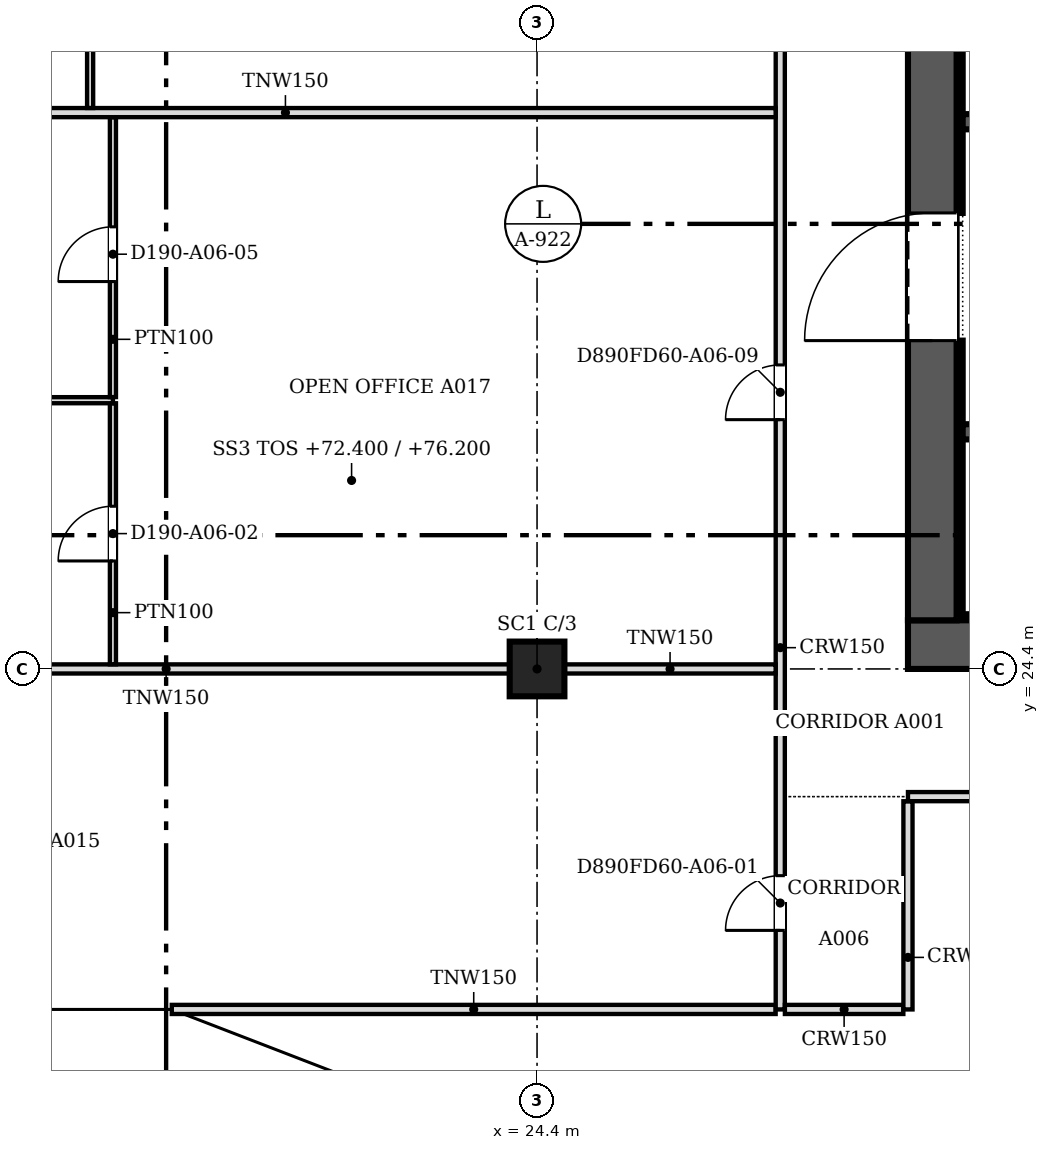
"""IFC4 building model, lengths in metres.
Left out: names, types, materials, properties, quantities, classifications, styles, units other than length and angle.
Written with IfcOpenShell. Run it as: python <this file> out.ifc"""

import sys

from ifc_helpers import new_model, si_unit, direction, frame, frame_2d, origin, origin_2d, place, context, subcontext, project, spatial, polyline, rectangle, outline, extrude, faceted_brep, source, transform, mapped, element, fill, save


model = new_model("IFC4")
c1 = context("Model", 3, precision=1e-05, world=origin(), true_north=direction((0.0, 1.0)))
c2 = subcontext(c1, "Body", "Model", "MODEL_VIEW")
j1 = project(units=[si_unit("LENGTHUNIT", "METRE"), si_unit("PLANEANGLEUNIT", "RADIAN")], contexts=[c1])
p1 = place(None, origin())
s1 = spatial("IfcSite", under=j1, at=p1, CompositionType="ELEMENT")
p2 = place(p1, origin())
s2 = spatial("IfcBuilding", under=s1, at=p2, CompositionType="ELEMENT")
p3 = place(p2, frame((0.0, 0.0, 72.4)))
s3 = spatial("IfcBuildingStorey", under=s2, at=p3, CompositionType="ELEMENT", Elevation=72.4)
p4 = place(p3, frame((24.4, 24.4, 0.0), z_axis=(0.0, 0.0, 1.0), x_axis=(1.0, 0.0, 0.0)))
e1 = element("IfcColumn", 1, at=p4, inside=s3, PredefinedType="COLUMN", context=c2, shape_type="SweptSolid", body=[
    extrude(rectangle(XDim=0.9, YDim=0.9, at=origin_2d()), origin(), (0.0, 0.0, 1.0), 3.6),
])
m1 = source(origin(), c2, "Body", "Brep", [
    faceted_brep([(3.05, -0.25, 0.0), (6.1, -0.25, 3.743), (6.1, -0.25, 3.857), (3.05, -0.25, 7.6), (0.0, -0.25, 3.8), (0.0, 0.25, 3.8), (3.05, 0.25, 7.6), (6.146, 0.25, 3.8), (3.05, 0.25, 0.0), (6.146, -0.0, 3.8)], [[[0, 1, 2, 3, 4]], [[5, 6, 7, 8]], [[8, 7, 9, 1, 0]], [[7, 6, 3, 2, 9]], [[6, 5, 4, 3]], [[5, 8, 0, 4]], [[1, 9, 2]]]),
])
p5 = place(p3, frame((12.2, 18.55, -3.8), z_axis=(0.0, 0.0, 1.0), x_axis=(1.0, 0.0, 0.0)))
e2 = element("IfcWall", 2, at=p5, inside=s3, PredefinedType="SOLIDWALL", context=c2, shape_type="MappedRepresentation", body=[
    mapped(m1, transform((0.0, 0.0, 0.0), scale=1.0)),
])
m2 = source(origin(), c2, "Body", "SweptSolid", [
    extrude(outline(polyline([(3.052, 0.397), (5.824, 3.8), (3.052, 7.202), (0.321, 3.8), (3.052, 0.397)])), frame((0.0, 0.26, 0.0), z_axis=(0.0, -1.0, 0.0), x_axis=(1.0, 0.0, 0.0)), (0.0, 0.0, 1.0), 0.52),
])
p6 = place(p5, origin())
e3 = element("IfcOpeningElement", 3, at=p6, cuts=e2, PredefinedType="OPENING", context=c2, shape_type="MappedRepresentation", body=[
    mapped(m2, transform((0.0, 0.0, 0.0), scale=1.0)),
])
m3 = source(origin(), c2, "Body", "Brep", [
    faceted_brep([(3.096, -0.25, 7.536), (0.047, -0.25, 3.856), (0.047, -0.25, 3.744), (3.096, -0.25, 0.064), (0.0, 0.25, 3.8), (3.149, 0.25, 7.6), (3.202, 0.25, 7.536), (3.202, 0.25, 0.064), (3.149, 0.25, 0.0), (3.149, -0.0, 0.0), (3.149, -0.0, 7.6), (0.0, 0.0, 3.8)], [[[0, 1, 2, 3]], [[4, 5, 6, 7, 8]], [[8, 7, 9]], [[6, 5, 10]], [[5, 4, 11, 1, 0, 10]], [[4, 8, 9, 3, 2, 11]], [[11, 2, 1]], [[3, 9, 7, 6, 10, 0]]]),
])
p7 = place(p3, frame((18.346, 18.55, -3.8), z_axis=(0.0, 0.0, 1.0), x_axis=(0.932985567668, -0.359913782069, 0.0)))
e4 = element("IfcWall", 4, at=p7, inside=s3, PredefinedType="SOLIDWALL", context=c2, shape_type="MappedRepresentation", body=[
    mapped(m3, transform((0.0, 0.0, 0.0), scale=1.0)),
])
m4 = source(origin(), c2, "Body", "SweptSolid", [
    extrude(outline(polyline([(2.949, 6.967), (0.325, 3.8), (2.949, 0.633), (2.949, 6.967)])), frame((0.0, 0.26, 0.0), z_axis=(0.0, -1.0, 0.0), x_axis=(1.0, 0.0, 0.0)), (0.0, 0.0, 1.0), 0.52),
])
p8 = place(p7, origin())
e5 = element("IfcOpeningElement", 5, at=p8, cuts=e4, PredefinedType="OPENING", context=c2, shape_type="MappedRepresentation", body=[
    mapped(m4, transform((0.0, 0.0, 0.0), scale=1.0)),
])
p9 = place(p2, frame((0.0, 0.0, 76.2)))
s4 = spatial("IfcBuildingStorey", under=s2, at=p9, CompositionType="ELEMENT", Elevation=76.2)
m5 = source(origin(), c2, "Body", "Brep", [
    faceted_brep([(3.05, -0.25, 7.543), (0.0, -0.25, 3.8), (3.05, -0.25, 0.057), (0.0, 0.25, 3.8), (3.096, 0.25, 7.6), (3.143, 0.25, 7.544), (3.143, 0.25, 0.056), (3.096, 0.25, 0.0), (3.096, -0.0, 0.0), (3.096, -0.0, 7.6)], [[[0, 1, 2]], [[3, 4, 5, 6, 7]], [[7, 6, 8]], [[5, 4, 9]], [[4, 3, 1, 0, 9]], [[3, 7, 8, 2, 1]], [[2, 8, 6, 5, 9, 0]]]),
])
p10 = place(p9, frame((15.25, 18.55, -3.8), z_axis=(0.0, 0.0, 1.0), x_axis=(1.0, 0.0, 0.0)))
e6 = element("IfcWall", 6, at=p10, inside=s4, PredefinedType="SOLIDWALL", context=c2, shape_type="MappedRepresentation", body=[
    mapped(m5, transform((0.0, 0.0, 0.0), scale=1.0)),
])
m6 = source(origin(), c2, "Body", "SweptSolid", [
    extrude(outline(polyline([(2.896, 6.959), (0.323, 3.8), (2.896, 0.641), (2.896, 6.959)])), frame((0.0, 0.26, 0.0), z_axis=(0.0, -1.0, 0.0), x_axis=(1.0, 0.0, 0.0)), (0.0, 0.0, 1.0), 0.52),
])
p11 = place(p10, origin())
e7 = element("IfcOpeningElement", 7, at=p11, cuts=e6, PredefinedType="OPENING", context=c2, shape_type="MappedRepresentation", body=[
    mapped(m6, transform((0.0, 0.0, 0.0), scale=1.0)),
])
m7 = source(origin(), c2, "Body", "Brep", [
    faceted_brep([(0.093, -0.25, 0.056), (3.143, -0.25, 3.736), (3.143, -0.25, 3.864), (0.093, -0.25, 7.544), (0.0, 0.25, 7.543), (0.047, 0.25, 7.6), (3.196, 0.25, 3.8), (0.047, 0.25, 0.0), (0.0, 0.25, 0.057), (3.196, -0.0, 3.8), (0.047, 0.0, 0.0), (0.047, 0.0, 7.6)], [[[0, 1, 2, 3]], [[4, 5, 6, 7, 8]], [[7, 6, 9, 1, 0, 10]], [[6, 5, 11, 3, 2, 9]], [[5, 4, 11]], [[8, 7, 10]], [[8, 10, 0, 3, 11, 4]], [[1, 9, 2]]]),
])
p12 = place(p9, frame((18.303, 18.567, -3.8), z_axis=(0.0, 0.0, 1.0), x_axis=(0.932978940178, -0.359930961693, 0.0)))
e8 = element("IfcWall", 8, at=p12, inside=s4, PredefinedType="SOLIDWALL", context=c2, shape_type="MappedRepresentation", body=[
    mapped(m7, transform((0.0, 0.0, 0.0), scale=1.0)),
])
m8 = source(origin(), c2, "Body", "SweptSolid", [
    extrude(outline(polyline([(0.247, 0.633), (2.871, 3.8), (0.247, 6.967), (0.247, 0.633)])), frame((0.0, 0.26, 0.0), z_axis=(0.0, -1.0, 0.0), x_axis=(1.0, 0.0, 0.0)), (0.0, 0.0, 1.0), 0.52),
])
p13 = place(p12, origin())
e9 = element("IfcOpeningElement", 9, at=p13, cuts=e8, PredefinedType="OPENING", context=c2, shape_type="MappedRepresentation", body=[
    mapped(m8, transform((0.0, 0.0, 0.0), scale=1.0)),
])
p14 = place(p3, frame((54.9, 24.8, 0.0), z_axis=(0.0, 0.0, 1.0), x_axis=(-1.0, 0.0, 0.0)))
e10 = element("IfcWall", 10, at=p14, inside=s3, PredefinedType="SHEAR", context=c2, shape_type="SweptSolid", body=[
    extrude(rectangle(XDim=24.4, YDim=0.8, at=frame_2d((12.2, 0.0))), origin(), (0.0, 0.0, 1.0), 3.8),
])
m9 = source(origin(), c2, "Body", "SweptSolid", [
    extrude(rectangle(XDim=1.2, YDim=2.1, at=frame_2d((0.6, 1.05))), frame((0.0, 0.41, 0.0), z_axis=(0.0, -1.0, 0.0), x_axis=(1.0, 0.0, 0.0)), (0.0, 0.0, 1.0), 0.82),
])
p15 = place(p14, frame((1.5, 0.0, 0.0)))
e11 = element("IfcOpeningElement", 11, at=p15, cuts=e10, PredefinedType="OPENING", context=c2, shape_type="MappedRepresentation", body=[
    mapped(m9, transform((0.0, 0.0, 0.0), scale=1.0)),
])
p16 = place(p3, frame((30.9, 25.2, 0.0), z_axis=(0.0, 0.0, 1.0), x_axis=(0.0, 1.0, 0.0)))
e12 = element("IfcWall", 12, at=p16, inside=s3, PredefinedType="SHEAR", context=c2, shape_type="SweptSolid", body=[
    extrude(rectangle(XDim=22.8, YDim=0.8, at=frame_2d((11.4, 0.0))), origin(), (0.0, 0.0, 1.0), 3.8),
])
m10 = source(origin(), c2, "Body", "SweptSolid", [
    extrude(rectangle(XDim=2.1, YDim=2.4, at=frame_2d((1.05, 1.2))), frame((0.0, 0.41, 0.0), z_axis=(0.0, -1.0, 0.0), x_axis=(1.0, 0.0, 0.0)), (0.0, 0.0, 1.0), 0.82),
])
p17 = place(p16, frame((4.6, 0.0, 0.0)))
e13 = element("IfcOpeningElement", 13, at=p17, cuts=e12, PredefinedType="OPENING", context=c2, shape_type="MappedRepresentation", body=[
    mapped(m10, transform((0.0, 0.0, 0.0), scale=1.0)),
])
p18 = place(p16, frame((16.1, 0.0, 0.0)))
e14 = element("IfcOpeningElement", 14, at=p18, cuts=e12, PredefinedType="OPENING", context=c2, shape_type="MappedRepresentation", body=[
    mapped(m10, transform((0.0, 0.0, 0.0), scale=1.0)),
])
p19 = place(p3, frame((31.3, 25.25, 0.0), z_axis=(0.0, 0.0, 1.0), x_axis=(1.0, 0.0, 0.0)))
e15 = element("IfcWall", 15, at=p19, inside=s3, PredefinedType="SOLIDWALL", context=c2, shape_type="SweptSolid", body=[
    extrude(rectangle(XDim=20.9, YDim=0.1, at=frame_2d((10.45, 0.0))), origin(), (0.0, 0.0, 1.0), 3.8),
])
p20 = place(p3, frame((31.35, 25.3, 0.0), z_axis=(0.0, 0.0, 1.0), x_axis=(0.0, 1.0, 0.0)))
e16 = element("IfcWall", 16, at=p20, inside=s3, PredefinedType="SOLIDWALL", context=c2, shape_type="SweptSolid", body=[
    extrude(rectangle(XDim=4.5, YDim=0.1, at=frame_2d((2.25, 0.0))), origin(), (0.0, 0.0, 1.0), 3.8),
])
p21 = place(p3, frame((31.35, 31.9, 0.0), z_axis=(0.0, 0.0, 1.0), x_axis=(0.0, 1.0, 0.0)))
e17 = element("IfcWall", 17, at=p21, inside=s3, PredefinedType="SOLIDWALL", context=c2, shape_type="SweptSolid", body=[
    extrude(rectangle(XDim=9.4, YDim=0.1, at=frame_2d((4.7, 0.0))), origin(), (0.0, 0.0, 1.0), 3.8),
])
p22 = place(p3, frame((42.45, 33.4, 0.0), z_axis=(0.0, 0.0, 1.0), x_axis=(-1.0, 0.0, 0.0)))
e18 = element("IfcWall", 18, at=p22, inside=s3, PredefinedType="SOLIDWALL", context=c2, shape_type="SweptSolid", body=[
    extrude(rectangle(XDim=11.05, YDim=0.25, at=frame_2d((5.525, 0.0))), origin(), (0.0, 0.0, 1.0), 3.8),
])
m11 = source(origin(), c2, "Body", "SweptSolid", [
    extrude(rectangle(XDim=1.1, YDim=2.1, at=frame_2d((0.55, 1.05))), frame((0.0, 0.135, 0.0), z_axis=(0.0, -1.0, 0.0), x_axis=(1.0, 0.0, 0.0)), (0.0, 0.0, 1.0), 0.27),
])
p23 = place(p22, frame((9.087, 0.0, 0.0)))
e19 = element("IfcOpeningElement", 19, at=p23, cuts=e18, PredefinedType="OPENING", context=c2, shape_type="MappedRepresentation", body=[
    mapped(m11, transform((0.0, 0.0, 0.0), scale=1.0)),
])
p24 = place(p22, frame((6.262, 0.0, 0.0)))
e20 = element("IfcOpeningElement", 20, at=p24, cuts=e18, PredefinedType="OPENING", context=c2, shape_type="MappedRepresentation", body=[
    mapped(m11, transform((0.0, 0.0, 0.0), scale=1.0)),
])
p25 = place(p22, frame((3.438, 0.0, 0.0)))
e21 = element("IfcOpeningElement", 21, at=p25, cuts=e18, PredefinedType="OPENING", context=c2, shape_type="MappedRepresentation", body=[
    mapped(m11, transform((0.0, 0.0, 0.0), scale=1.0)),
])
p26 = place(p22, frame((0.613, 0.0, 0.0)))
e22 = element("IfcOpeningElement", 22, at=p26, cuts=e18, PredefinedType="OPENING", context=c2, shape_type="MappedRepresentation", body=[
    mapped(m11, transform((0.0, 0.0, 0.0), scale=1.0)),
])
p27 = place(p3, frame((31.4, 28.3, 0.0), z_axis=(0.0, 0.0, 1.0), x_axis=(1.0, 0.0, 0.0)))
e23 = element("IfcWall", 23, at=p27, inside=s3, PredefinedType="SOLIDWALL", context=c2, shape_type="SweptSolid", body=[
    extrude(rectangle(XDim=11.05, YDim=0.25, at=frame_2d((5.525, 0.0))), origin(), (0.0, 0.0, 1.0), 3.8),
])
p28 = place(p27, frame((0.863, 0.0, 0.0)))
e24 = element("IfcOpeningElement", 24, at=p28, cuts=e23, PredefinedType="OPENING", context=c2, shape_type="MappedRepresentation", body=[
    mapped(m11, transform((0.0, 0.0, 0.0), scale=1.0)),
])
p29 = place(p27, frame((3.688, 0.0, 0.0)))
e25 = element("IfcOpeningElement", 25, at=p29, cuts=e23, PredefinedType="OPENING", context=c2, shape_type="MappedRepresentation", body=[
    mapped(m11, transform((0.0, 0.0, 0.0), scale=1.0)),
])
p30 = place(p27, frame((6.512, 0.0, 0.0)))
e26 = element("IfcOpeningElement", 26, at=p30, cuts=e23, PredefinedType="OPENING", context=c2, shape_type="MappedRepresentation", body=[
    mapped(m11, transform((0.0, 0.0, 0.0), scale=1.0)),
])
p31 = place(p27, frame((9.337, 0.0, 0.0)))
e27 = element("IfcOpeningElement", 27, at=p31, cuts=e23, PredefinedType="OPENING", context=c2, shape_type="MappedRepresentation", body=[
    mapped(m11, transform((0.0, 0.0, 0.0), scale=1.0)),
])
p32 = place(p3, frame((18.393, 18.8, 0.0), z_axis=(0.0, 0.0, 1.0), x_axis=(1.0, 0.0, 0.0)))
e28 = element("IfcWall", 28, at=p32, inside=s3, PredefinedType="PARTITIONING", context=c2, shape_type="SweptSolid", body=[
    extrude(rectangle(XDim=9.931, YDim=0.15, at=frame_2d((4.965, 0.0))), origin(), (0.0, 0.0, 1.0), 3.067),
])
p33 = place(p3, frame((28.4, 18.8, 0.0), z_axis=(0.0, 0.0, 1.0), x_axis=(0.0, 1.0, 0.0)))
e29 = element("IfcWall", 29, at=p33, inside=s3, PredefinedType="PARTITIONING", context=c2, shape_type="SweptSolid", body=[
    extrude(rectangle(XDim=26.824, YDim=0.15, at=frame_2d((13.412, 0.0))), origin(), (0.0, 0.0, 1.0), 3.067),
])
m12 = source(origin(), c2, "Body", "SweptSolid", [
    extrude(rectangle(XDim=0.9, YDim=2.1, at=frame_2d((0.45, 1.05))), frame((0.0, 0.085, 0.0), z_axis=(0.0, -1.0, 0.0), x_axis=(1.0, 0.0, 0.0)), (0.0, 0.0, 1.0), 0.17),
])
p34 = place(p33, frame((1.3, 0.0, 0.0)))
e30 = element("IfcOpeningElement", 30, at=p34, cuts=e29, PredefinedType="OPENING", context=c2, shape_type="MappedRepresentation", body=[
    mapped(m12, transform((0.0, 0.0, 0.0), scale=1.0)),
])
p35 = place(p33, frame((23.351, 0.0, 0.0)))
e31 = element("IfcOpeningElement", 31, at=p35, cuts=e29, PredefinedType="OPENING", context=c2, shape_type="MappedRepresentation", body=[
    mapped(m12, transform((0.0, 0.0, 0.0), scale=1.0)),
])
p36 = place(p33, frame((17.351, 0.0, 0.0)))
e32 = element("IfcOpeningElement", 32, at=p36, cuts=e29, PredefinedType="OPENING", context=c2, shape_type="MappedRepresentation", body=[
    mapped(m12, transform((0.0, 0.0, 0.0), scale=1.0)),
])
p37 = place(p33, frame((9.7, 0.0, 0.0)))
e33 = element("IfcOpeningElement", 33, at=p37, cuts=e29, PredefinedType="OPENING", context=c2, shape_type="MappedRepresentation", body=[
    mapped(m12, transform((0.0, 0.0, 0.0), scale=1.0)),
])
p38 = place(p3, frame((28.476, 18.8, 0.0), z_axis=(0.0, 0.0, 1.0), x_axis=(1.0, 0.0, 0.0)))
e34 = element("IfcWall", 34, at=p38, inside=s3, PredefinedType="PARTITIONING", context=c2, shape_type="SweptSolid", body=[
    extrude(rectangle(XDim=1.948, YDim=0.15, at=frame_2d((0.974, 0.0))), origin(), (0.0, 0.0, 1.0), 3.067),
])
p39 = place(p3, frame((30.5, 18.8, 0.0), z_axis=(0.0, 0.0, 1.0), x_axis=(0.0, 1.0, 0.0)))
e35 = element("IfcWall", 35, at=p39, inside=s3, PredefinedType="PARTITIONING", context=c2, shape_type="SweptSolid", body=[
    extrude(rectangle(XDim=3.424, YDim=0.15, at=frame_2d((1.712, 0.0))), origin(), (0.0, 0.0, 1.0), 3.067),
])
p40 = place(p3, frame((30.5, 22.3, 0.0), z_axis=(0.0, 0.0, 1.0), x_axis=(1.0, 0.0, 0.0)))
e36 = element("IfcWall", 36, at=p40, inside=s3, PredefinedType="PARTITIONING", context=c2, shape_type="SweptSolid", body=[
    extrude(rectangle(XDim=14.5, YDim=0.15, at=frame_2d((7.25, 0.0))), origin(), (0.0, 0.0, 1.0), 3.067),
])
p41 = place(p3, frame((12.651, 24.4, 0.0), z_axis=(0.0, 0.0, 1.0), x_axis=(1.0, 0.0, 0.0)))
e37 = element("IfcWall", 37, at=p41, inside=s3, PredefinedType="PARTITIONING", context=c2, shape_type="SweptSolid", body=[
    extrude(rectangle(XDim=11.298, YDim=0.15, at=frame_2d((5.649, 0.0))), origin(), (0.0, 0.0, 1.0), 3.067),
])
p42 = place(p3, frame((24.851, 24.4, 0.0), z_axis=(0.0, 0.0, 1.0), x_axis=(1.0, 0.0, 0.0)))
e38 = element("IfcWall", 38, at=p42, inside=s3, PredefinedType="PARTITIONING", context=c2, shape_type="SweptSolid", body=[
    extrude(rectangle(XDim=3.473, YDim=0.15, at=frame_2d((1.736, 0.0))), origin(), (0.0, 0.0, 1.0), 3.067),
])
p43 = place(p3, frame((17.425, 24.476, 0.0), z_axis=(0.0, 0.0, 1.0), x_axis=(0.0, 1.0, 0.0)))
e39 = element("IfcWall", 39, at=p43, inside=s3, PredefinedType="PARTITIONING", context=c2, shape_type="SweptSolid", body=[
    extrude(rectangle(XDim=4.293, YDim=0.1, at=frame_2d((2.146, 0.0))), origin(), (0.0, 0.0, 1.0), 3.067),
])
m13 = source(origin(), c2, "Body", "SweptSolid", [
    extrude(rectangle(XDim=0.9, YDim=2.1, at=frame_2d((0.45, 1.05))), frame((0.0, 0.06, 0.0), z_axis=(0.0, -1.0, 0.0), x_axis=(1.0, 0.0, 0.0)), (0.0, 0.0, 1.0), 0.12),
])
p44 = place(p43, frame((1.7, 0.0, 0.0)))
e40 = element("IfcOpeningElement", 40, at=p44, cuts=e39, PredefinedType="OPENING", context=c2, shape_type="MappedRepresentation", body=[
    mapped(m13, transform((0.0, 0.0, 0.0), scale=1.0)),
])
p45 = place(p3, frame((12.2, 28.82, 0.0), z_axis=(0.0, 0.0, 1.0), x_axis=(1.0, 0.0, 0.0)))
e41 = element("IfcWall", 41, at=p45, inside=s3, PredefinedType="PARTITIONING", context=c2, shape_type="SweptSolid", body=[
    extrude(rectangle(XDim=5.225, YDim=0.1, at=frame_2d((2.613, 0.0))), origin(), (0.0, 0.0, 1.0), 3.067),
])
p46 = place(p3, frame((17.425, 28.871, 0.0), z_axis=(0.0, 0.0, 1.0), x_axis=(0.0, 1.0, 0.0)))
e42 = element("IfcWall", 42, at=p46, inside=s3, PredefinedType="PARTITIONING", context=c2, shape_type="SweptSolid", body=[
    extrude(rectangle(XDim=4.603, YDim=0.1, at=frame_2d((2.301, 0.0))), origin(), (0.0, 0.0, 1.0), 3.067),
])
p47 = place(p46, frame((1.9, 0.0, 0.0)))
e43 = element("IfcOpeningElement", 43, at=p47, cuts=e42, PredefinedType="OPENING", context=c2, shape_type="MappedRepresentation", body=[
    mapped(m13, transform((0.0, 0.0, 0.0), scale=1.0)),
])
p48 = place(p3, frame((12.2, 33.55, 0.0), z_axis=(0.0, 0.0, 1.0), x_axis=(1.0, 0.0, 0.0)))
e44 = element("IfcWall", 44, at=p48, inside=s3, PredefinedType="PARTITIONING", context=c2, shape_type="SweptSolid", body=[
    extrude(rectangle(XDim=16.124, YDim=0.15, at=frame_2d((8.062, 0.0))), origin(), (0.0, 0.0, 1.0), 3.067),
])
p49 = place(p3, frame((17.05, 33.626, 0.0), z_axis=(0.0, 0.0, 1.0), x_axis=(0.0, 1.0, 0.0)))
e45 = element("IfcWall", 45, at=p49, inside=s3, PredefinedType="PARTITIONING", context=c2, shape_type="SweptSolid", body=[
    extrude(rectangle(XDim=5.948, YDim=0.1, at=frame_2d((2.974, 0.0))), origin(), (0.0, 0.0, 1.0), 3.067),
])
p50 = place(p49, frame((2.5, 0.0, 0.0)))
e46 = element("IfcOpeningElement", 46, at=p50, cuts=e45, PredefinedType="OPENING", context=c2, shape_type="MappedRepresentation", body=[
    mapped(m13, transform((0.0, 0.0, 0.0), scale=1.0)),
])
m14 = source(origin(), c2, "Body", "SweptSolid", [
    extrude(rectangle(XDim=2.1, YDim=2.4, at=frame_2d((1.05, 1.2))), frame((0.0, 0.025, 0.0), z_axis=(0.0, -1.0, 0.0), x_axis=(1.0, 0.0, 0.0)), (0.0, 0.0, 1.0), 0.05),
])
p51 = place(p17, origin())
e47 = element("IfcDoor", 47, at=p51, inside=s3, OperationType="DOUBLE_DOOR_SINGLE_SWING", PredefinedType="DOOR", context=c2, shape_type="MappedRepresentation", body=[
    mapped(m14, transform((0.0, 0.0, 0.0), scale=1.0)),
])
fill(e13, e47)
m15 = source(origin(), c2, "Body", "SweptSolid", [
    extrude(rectangle(XDim=0.9, YDim=2.1, at=frame_2d((0.45, 1.05))), frame((0.0, 0.025, 0.0), z_axis=(0.0, -1.0, 0.0), x_axis=(1.0, 0.0, 0.0)), (0.0, 0.0, 1.0), 0.05),
])
p52 = place(p34, origin())
e48 = element("IfcDoor", 48, at=p52, inside=s3, OperationType="SINGLE_SWING_LEFT", PredefinedType="DOOR", context=c2, shape_type="MappedRepresentation", body=[
    mapped(m15, transform((0.0, 0.0, 0.0), scale=1.0)),
])
fill(e30, e48)
p53 = place(p44, origin())
e49 = element("IfcDoor", 49, at=p53, inside=s3, OperationType="SINGLE_SWING_LEFT", PredefinedType="DOOR", context=c2, shape_type="MappedRepresentation", body=[
    mapped(m15, transform((0.0, 0.0, 0.0), scale=1.0)),
])
fill(e40, e49)
p54 = place(p47, origin())
e50 = element("IfcDoor", 50, at=p54, inside=s3, OperationType="SINGLE_SWING_LEFT", PredefinedType="DOOR", context=c2, shape_type="MappedRepresentation", body=[
    mapped(m15, transform((0.0, 0.0, 0.0), scale=1.0)),
])
fill(e43, e50)
p55 = place(p37, origin())
e51 = element("IfcDoor", 51, at=p55, inside=s3, OperationType="SINGLE_SWING_LEFT", PredefinedType="DOOR", context=c2, shape_type="MappedRepresentation", body=[
    mapped(m15, transform((0.0, 0.0, 0.0), scale=1.0)),
])
fill(e33, e51)
save(model, sys.argv[1])
